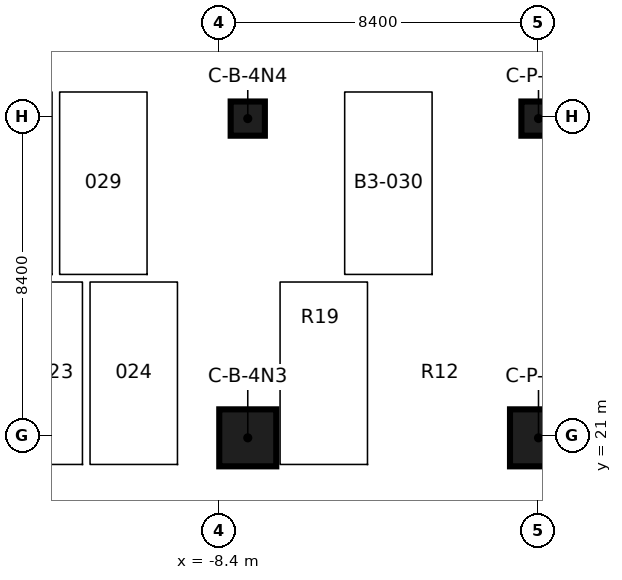
"""IFC4 building model, lengths in metres.
Left out: names, types, materials, properties, quantities, classifications, styles, units other than length and angle.
Written with IfcOpenShell. Run it as: python <this file> out.ifc"""

import sys

from ifc_helpers import new_model, si_unit, direction, frame, origin, origin_2d, place, context, subcontext, project, spatial, rectangle, extrude, element, save


model = new_model("IFC4")
c1 = context("Model", 3, precision=1e-05, world=origin(), true_north=direction((0.0, 1.0)))
c2 = subcontext(c1, "Body", "Model", "MODEL_VIEW")
j1 = project(units=[si_unit("LENGTHUNIT", "METRE"), si_unit("PLANEANGLEUNIT", "RADIAN")], contexts=[c1])
p1 = place(None, origin())
s1 = spatial("IfcSite", under=j1, at=p1, CompositionType="ELEMENT")
p2 = place(p1, origin())
s2 = spatial("IfcBuilding", under=s1, at=p2, CompositionType="ELEMENT")
p3 = place(p2, frame((0.0, 0.0, -13.0)))
s3 = spatial("IfcBuildingStorey", under=s2, at=p3, CompositionType="ELEMENT", Elevation=-13.0)
p4 = place(p3, frame((-7.65, 21.0, 0.0), z_axis=(0.0, 0.0, 1.0), x_axis=(1.0, 0.0, 0.0)))
e1 = element("IfcColumn", 1, at=p4, inside=s3, PredefinedType="COLUMN", context=c2, shape_type="SweptSolid", body=[
    extrude(rectangle(XDim=1.5, YDim=1.5, at=origin_2d()), origin(), (0.0, 0.0, 1.0), 3.7),
])
p5 = place(p3, frame((-7.65, 29.4, 0.0), z_axis=(0.0, 0.0, 1.0), x_axis=(1.0, 0.0, 0.0)))
e2 = element("IfcColumn", 2, at=p5, inside=s3, PredefinedType="COLUMN", context=c2, shape_type="SweptSolid", body=[
    extrude(rectangle(XDim=0.9, YDim=0.9, at=origin_2d()), origin(), (0.0, 0.0, 1.0), 3.7),
])
p6 = place(p3, frame((0.0, 21.0, 0.0), z_axis=(0.0, 0.0, 1.0), x_axis=(1.0, 0.0, 0.0)))
e3 = element("IfcColumn", 3, at=p6, inside=s3, PredefinedType="COLUMN", context=c2, shape_type="SweptSolid", body=[
    extrude(rectangle(XDim=1.5, YDim=1.5, at=origin_2d()), origin(), (0.0, 0.0, 1.0), 3.7),
])
p7 = place(p3, frame((0.0, 29.4, 0.0), z_axis=(0.0, 0.0, 1.0), x_axis=(1.0, 0.0, 0.0)))
e4 = element("IfcColumn", 4, at=p7, inside=s3, PredefinedType="COLUMN", context=c2, shape_type="SweptSolid", body=[
    extrude(rectangle(XDim=0.9, YDim=0.9, at=origin_2d()), origin(), (0.0, 0.0, 1.0), 3.7),
])
save(model, sys.argv[1])
